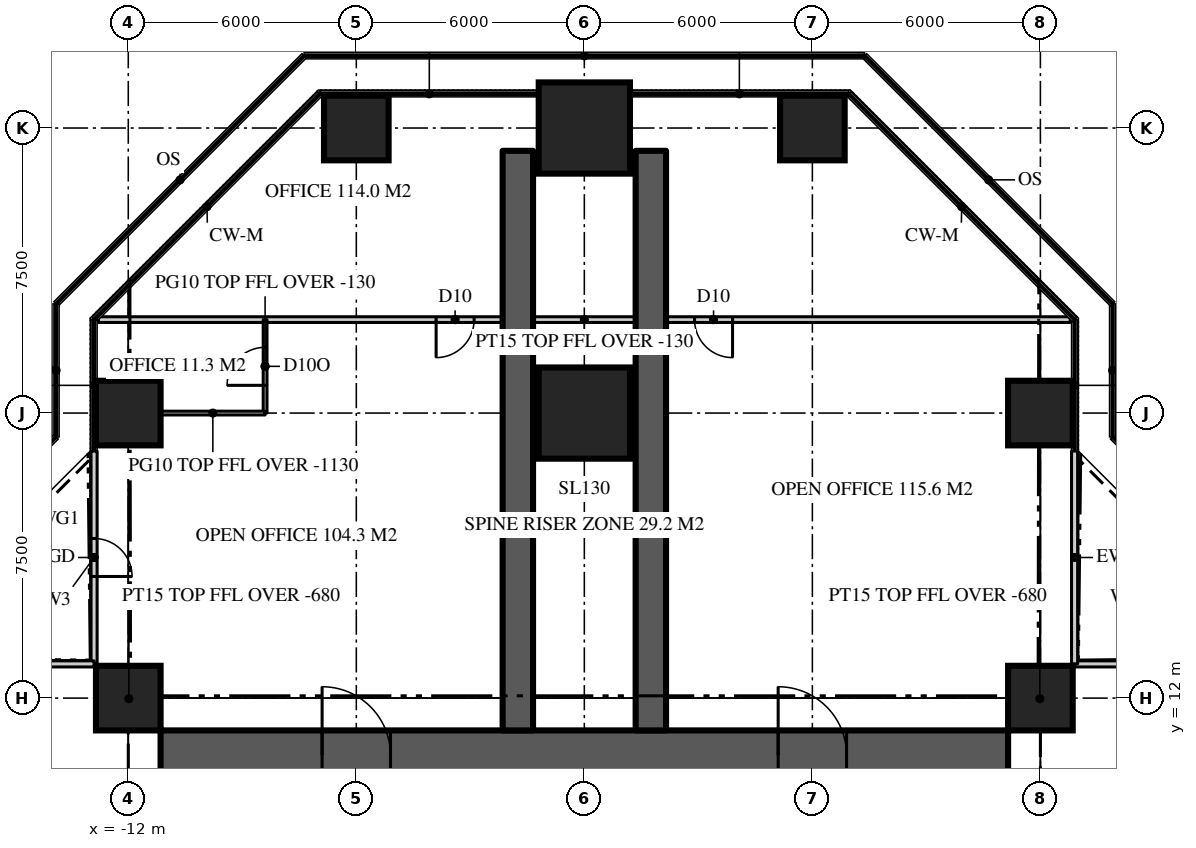
"""IFC4 building model, lengths in metres.
Left out: names, types, materials, properties, quantities, classifications, styles, units other than length and angle.
Written with IfcOpenShell. Run it as: python <this file> out.ifc"""

import sys

from ifc_helpers import new_model, si_unit, direction, frame, frame_2d, origin, origin_2d, place, context, subcontext, project, spatial, rectangle, extrude, element, fill, save


model = new_model("IFC4")
c1 = context("Model", 3, precision=1e-05, world=origin(), true_north=direction((0.0, 1.0)))
c2 = subcontext(c1, "Body", "Model", "MODEL_VIEW")
j1 = project(units=[si_unit("LENGTHUNIT", "METRE"), si_unit("PLANEANGLEUNIT", "RADIAN")], contexts=[c1])
p1 = place(None, origin())
s1 = spatial("IfcSite", under=j1, at=p1, CompositionType="ELEMENT")
p2 = place(p1, origin())
s2 = spatial("IfcBuilding", under=s1, at=p2, CompositionType="ELEMENT")
p3 = place(p2, frame((0.0, 0.0, 182.7)))
s3 = spatial("IfcBuildingStorey", under=s2, at=p3, CompositionType="ELEMENT", Elevation=182.7)
p4 = place(p3, frame((-11.15, 10.5, 0.0), z_axis=(0.0, 0.0, 1.0), x_axis=(1.0, 0.0, 0.0)))
e1 = element("IfcWall", 1, at=p4, inside=s3, PredefinedType="SHEAR", context=c2, shape_type="SweptSolid", body=[
    extrude(rectangle(XDim=22.3, YDim=1.3, at=frame_2d((11.15, 0.0))), origin(), (0.0, 0.0, 1.0), 3.9),
])
p5 = place(p4, frame((4.25, 0.0, 0.0)))
e2 = element("IfcOpeningElement", 2, at=p5, cuts=e1, PredefinedType="OPENING", context=c2, shape_type="SweptSolid", body=[
    extrude(rectangle(XDim=1.8, YDim=2.2, at=frame_2d((0.9, 1.1))), frame((0.0, 0.66, 0.0), z_axis=(0.0, -1.0, 0.0), x_axis=(1.0, 0.0, 0.0)), (0.0, 0.0, 1.0), 1.32),
])
p6 = place(p4, frame((16.25, 0.0, 0.0)))
e3 = element("IfcOpeningElement", 3, at=p6, cuts=e1, PredefinedType="OPENING", context=c2, shape_type="SweptSolid", body=[
    extrude(rectangle(XDim=1.8, YDim=2.2, at=frame_2d((0.9, 1.1))), frame((0.0, 0.66, 0.0), z_axis=(0.0, -1.0, 0.0), x_axis=(1.0, 0.0, 0.0)), (0.0, 0.0, 1.0), 1.32),
])
for number, where, z_axis, x_axis in (
    (4, (1.75, 11.15, 0.0), (0.0, 0.0, 1.0), (0.0, 1.0, 0.0)),
    (5, (-1.75, 11.15, 0.0), (0.0, 0.0, 1.0), (0.0, 1.0, 0.0)),
):
    element("IfcWall", number, at=place(p3, frame(where, z_axis=z_axis, x_axis=x_axis)), inside=s3, PredefinedType="SHEAR", context=c2, shape_type="SweptSolid", body=[
        extrude(rectangle(XDim=15.25, YDim=0.8, at=frame_2d((7.625, 0.0))), origin(), (0.0, 0.0, 1.0), 3.9),
    ])
for number, where, z_axis, x_axis in (
    (6, (-12.0, 12.0, 0.0), (0.0, 0.0, 1.0), (1.0, 0.0, 0.0)),
    (7, (12.0, 12.0, 0.0), (0.0, 0.0, 1.0), (1.0, 0.0, 0.0)),
    (8, (-12.0, 19.5, 0.0), (0.0, 0.0, 1.0), (1.0, 0.0, 0.0)),
):
    element("IfcColumn", number, at=place(p3, frame(where, z_axis=z_axis, x_axis=x_axis)), inside=s3, PredefinedType="COLUMN", context=c2, shape_type="SweptSolid", body=[
        extrude(rectangle(XDim=1.7, YDim=1.7, at=origin_2d()), origin(), (0.0, 0.0, 1.0), 3.9),
    ])
p7 = place(p3, frame((0.0, 19.5, 0.0), z_axis=(0.0, 0.0, 1.0), x_axis=(1.0, 0.0, 0.0)))
e9 = element("IfcColumn", 9, at=p7, inside=s3, PredefinedType="COLUMN", context=c2, shape_type="SweptSolid", body=[
    extrude(rectangle(XDim=2.4, YDim=2.4, at=origin_2d()), origin(), (0.0, 0.0, 1.0), 3.9),
])
for number, where, z_axis, x_axis in (
    (10, (12.0, 19.5, 0.0), (0.0, 0.0, 1.0), (1.0, 0.0, 0.0)),
    (11, (-6.0, 27.0, 0.0), (0.0, 0.0, 1.0), (1.0, 0.0, 0.0)),
):
    element("IfcColumn", number, at=place(p3, frame(where, z_axis=z_axis, x_axis=x_axis)), inside=s3, PredefinedType="COLUMN", context=c2, shape_type="SweptSolid", body=[
        extrude(rectangle(XDim=1.7, YDim=1.7, at=origin_2d()), origin(), (0.0, 0.0, 1.0), 3.9),
    ])
p8 = place(p3, frame((0.0, 27.0, 0.0), z_axis=(0.0, 0.0, 1.0), x_axis=(1.0, 0.0, 0.0)))
e12 = element("IfcColumn", 12, at=p8, inside=s3, PredefinedType="COLUMN", context=c2, shape_type="SweptSolid", body=[
    extrude(rectangle(XDim=2.4, YDim=2.4, at=origin_2d()), origin(), (0.0, 0.0, 1.0), 3.9),
])
p9 = place(p3, frame((6.0, 27.0, 0.0), z_axis=(0.0, 0.0, 1.0), x_axis=(1.0, 0.0, 0.0)))
e13 = element("IfcColumn", 13, at=p9, inside=s3, PredefinedType="COLUMN", context=c2, shape_type="SweptSolid", body=[
    extrude(rectangle(XDim=1.7, YDim=1.7, at=origin_2d()), origin(), (0.0, 0.0, 1.0), 3.9),
])
p10 = place(p3, frame((18.5, 12.9, 0.0), z_axis=(0.0, 0.0, 1.0), x_axis=(-1.0, 0.0, 0.0)))
e14 = element("IfcWall", 14, at=p10, inside=s3, PredefinedType="SOLIDWALL", context=c2, shape_type="SweptSolid", body=[
    extrude(rectangle(XDim=5.6, YDim=0.16, at=frame_2d((2.8, 0.0))), origin(), (0.0, 0.0, 1.0), 3.77),
])
p11 = place(p10, frame((2.3, 0.0, 0.0)))
e15 = element("IfcOpeningElement", 15, at=p11, cuts=e14, PredefinedType="OPENING", context=c2, shape_type="SweptSolid", body=[
    extrude(rectangle(XDim=1.0, YDim=2.2, at=frame_2d((0.5, 1.1))), frame((0.0, 0.09, 0.0), z_axis=(0.0, -1.0, 0.0), x_axis=(1.0, 0.0, 0.0)), (0.0, 0.0, 1.0), 0.18),
])
p12 = place(p3, frame((12.9, 12.9, 0.0), z_axis=(0.0, 0.0, 1.0), x_axis=(0.0, 1.0, 0.0)))
e16 = element("IfcWall", 16, at=p12, inside=s3, PredefinedType="SOLIDWALL", context=c2, shape_type="SweptSolid", body=[
    extrude(rectangle(XDim=5.6, YDim=0.16, at=frame_2d((2.8, 0.0))), origin(), (0.0, 0.0, 1.0), 3.77),
])
p13 = place(p3, frame((-12.9, 18.5, 0.0), z_axis=(0.0, 0.0, 1.0), x_axis=(0.0, -1.0, 0.0)))
e17 = element("IfcWall", 17, at=p13, inside=s3, PredefinedType="SOLIDWALL", context=c2, shape_type="SweptSolid", body=[
    extrude(rectangle(XDim=5.6, YDim=0.16, at=frame_2d((2.8, 0.0))), origin(), (0.0, 0.0, 1.0), 3.77),
])
p14 = place(p13, frame((2.3, 0.0, 0.0)))
e18 = element("IfcOpeningElement", 18, at=p14, cuts=e17, PredefinedType="OPENING", context=c2, shape_type="SweptSolid", body=[
    extrude(rectangle(XDim=1.0, YDim=2.2, at=frame_2d((0.5, 1.1))), frame((0.0, 0.09, 0.0), z_axis=(0.0, -1.0, 0.0), x_axis=(1.0, 0.0, 0.0)), (0.0, 0.0, 1.0), 0.18),
])
p15 = place(p3, frame((-12.9, 12.9, 0.0), z_axis=(0.0, 0.0, 1.0), x_axis=(-1.0, 0.0, 0.0)))
e19 = element("IfcWall", 19, at=p15, inside=s3, PredefinedType="SOLIDWALL", context=c2, shape_type="SweptSolid", body=[
    extrude(rectangle(XDim=5.6, YDim=0.16, at=frame_2d((2.8, 0.0))), origin(), (0.0, 0.0, 1.0), 3.77),
])
p16 = place(p3, frame((12.786, 21.959, 0.0), z_axis=(0.0, 0.0, 1.0), x_axis=(-1.0, 0.0, 0.0)))
e20 = element("IfcWall", 20, at=p16, inside=s3, PredefinedType="PARTITIONING", context=c2, shape_type="SweptSolid", body=[
    extrude(rectangle(XDim=25.573, YDim=0.15, at=frame_2d((12.786, 0.0))), origin(), (0.0, 0.0, 1.0), 3.77),
])
p17 = place(p16, frame((15.687, 0.0, 0.0)))
e21 = element("IfcOpeningElement", 21, at=p17, cuts=e20, PredefinedType="OPENING", context=c2, shape_type="SweptSolid", body=[
    extrude(rectangle(XDim=1.0, YDim=2.2, at=frame_2d((0.5, 1.1))), frame((0.0, 0.085, 0.0), z_axis=(0.0, -1.0, 0.0), x_axis=(1.0, 0.0, 0.0)), (0.0, 0.0, 1.0), 0.17),
])
p18 = place(p16, frame((8.886, 0.0, 0.0)))
e22 = element("IfcOpeningElement", 22, at=p18, cuts=e20, PredefinedType="OPENING", context=c2, shape_type="SweptSolid", body=[
    extrude(rectangle(XDim=1.0, YDim=2.2, at=frame_2d((0.5, 1.1))), frame((0.0, 0.085, 0.0), z_axis=(0.0, -1.0, 0.0), x_axis=(1.0, 0.0, 0.0)), (0.0, 0.0, 1.0), 0.17),
])
p19 = place(p3, frame((-8.4, 19.5, 0.0), z_axis=(0.0, 0.0, 1.0), x_axis=(0.0, 1.0, 0.0)))
e23 = element("IfcWall", 23, at=p19, inside=s3, PredefinedType="PARTITIONING", context=c2, shape_type="SweptSolid", body=[
    extrude(rectangle(XDim=2.459, YDim=0.1, at=frame_2d((1.229, 0.0))), origin(), (0.0, 0.0, 1.0), 3.77),
])
p20 = place(p19, frame((0.729, 0.0, 0.0)))
e24 = element("IfcOpeningElement", 24, at=p20, cuts=e23, PredefinedType="OPENING", context=c2, shape_type="SweptSolid", body=[
    extrude(rectangle(XDim=1.0, YDim=2.2, at=frame_2d((0.5, 1.1))), frame((0.0, 0.06, 0.0), z_axis=(0.0, -1.0, 0.0), x_axis=(1.0, 0.0, 0.0)), (0.0, 0.0, 1.0), 0.12),
])
p21 = place(p3, frame((-8.4, 19.5, 0.0), z_axis=(0.0, 0.0, 1.0), x_axis=(-1.0, 0.0, 0.0)))
e25 = element("IfcWall", 25, at=p21, inside=s3, PredefinedType="PARTITIONING", context=c2, shape_type="SweptSolid", body=[
    extrude(rectangle(XDim=2.75, YDim=0.1, at=frame_2d((1.375, 0.0))), origin(), (0.0, 0.0, 1.0), 2.77),
])
for number, where, z_axis, x_axis in (
    (26, (11.15, 11.15, 0.0), (0.0, 0.0, 1.0), (0.707, 0.707, 0.0)),
    (27, (-11.15, 11.15, 0.0), (0.0, 0.0, 1.0), (-0.707, 0.707, 0.0)),
):
    element("IfcWall", number, at=place(p3, frame(where, z_axis=z_axis, x_axis=x_axis)), inside=s3, PredefinedType="PARTITIONING", context=c2, shape_type="SweptSolid", body=[
        extrude(rectangle(XDim=2.362, YDim=0.15, at=frame_2d((1.181, 0.0))), origin(), (0.0, 0.0, 1.0), 3.22),
    ])
p22 = place(p14, origin())
e28 = element("IfcDoor", 28, at=p22, inside=s3, OperationType="SINGLE_SWING_RIGHT", PredefinedType="DOOR", context=c2, shape_type="SweptSolid", body=[
    extrude(rectangle(XDim=1.0, YDim=2.2, at=frame_2d((0.5, 1.1))), frame((0.0, 0.025, 0.0), z_axis=(0.0, -1.0, 0.0), x_axis=(1.0, 0.0, 0.0)), (0.0, 0.0, 1.0), 0.05),
])
fill(e18, e28)
p23 = place(p5, origin())
e29 = element("IfcDoor", 29, at=p23, inside=s3, OperationType="DOUBLE_DOOR_DOUBLE_SWING", PredefinedType="DOOR", context=c2, shape_type="SweptSolid", body=[
    extrude(rectangle(XDim=1.8, YDim=2.2, at=frame_2d((0.9, 1.1))), frame((0.0, 0.025, 0.0), z_axis=(0.0, -1.0, 0.0), x_axis=(1.0, 0.0, 0.0)), (0.0, 0.0, 1.0), 0.05),
])
fill(e2, e29)
p24 = place(p6, origin())
e30 = element("IfcDoor", 30, at=p24, inside=s3, OperationType="DOUBLE_DOOR_DOUBLE_SWING", PredefinedType="DOOR", context=c2, shape_type="SweptSolid", body=[
    extrude(rectangle(XDim=1.8, YDim=2.2, at=frame_2d((0.9, 1.1))), frame((0.0, 0.025, 0.0), z_axis=(0.0, -1.0, 0.0), x_axis=(1.0, 0.0, 0.0)), (0.0, 0.0, 1.0), 0.05),
])
fill(e3, e30)
p25 = place(p17, origin())
e31 = element("IfcDoor", 31, at=p25, inside=s3, OperationType="SINGLE_SWING_RIGHT", PredefinedType="DOOR", context=c2, shape_type="SweptSolid", body=[
    extrude(rectangle(XDim=1.0, YDim=2.2, at=frame_2d((0.5, 1.1))), frame((0.0, 0.025, 0.0), z_axis=(0.0, -1.0, 0.0), x_axis=(1.0, 0.0, 0.0)), (0.0, 0.0, 1.0), 0.05),
])
fill(e21, e31)
p26 = place(p18, origin())
e32 = element("IfcDoor", 32, at=p26, inside=s3, OperationType="SINGLE_SWING_LEFT", PredefinedType="DOOR", context=c2, shape_type="SweptSolid", body=[
    extrude(rectangle(XDim=1.0, YDim=2.2, at=frame_2d((0.5, 1.1))), frame((0.0, 0.025, 0.0), z_axis=(0.0, -1.0, 0.0), x_axis=(1.0, 0.0, 0.0)), (0.0, 0.0, 1.0), 0.05),
])
fill(e22, e32)
p27 = place(p20, origin())
e33 = element("IfcDoor", 33, at=p27, inside=s3, OperationType="SINGLE_SWING_LEFT", PredefinedType="DOOR", context=c2, shape_type="SweptSolid", body=[
    extrude(rectangle(XDim=1.0, YDim=2.2, at=frame_2d((0.5, 1.1))), frame((0.0, 0.025, 0.0), z_axis=(0.0, -1.0, 0.0), x_axis=(1.0, 0.0, 0.0)), (0.0, 0.0, 1.0), 0.05),
])
fill(e24, e33)
save(model, sys.argv[1])
